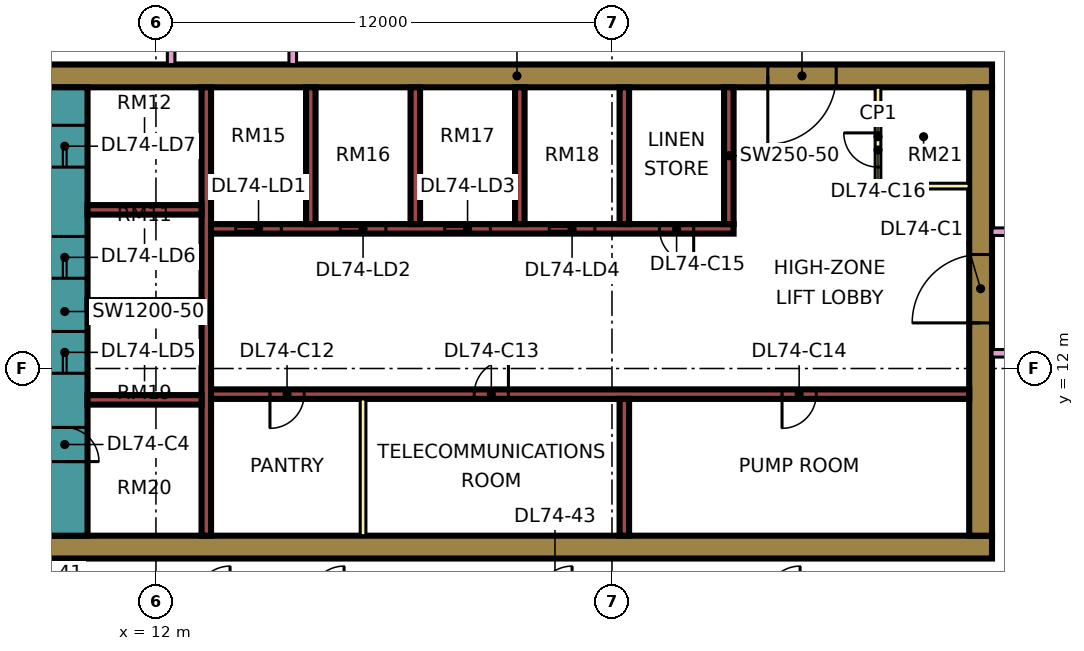
"""IFC4 building model, lengths in metres.
Left out: names, types, materials, properties, quantities, classifications, styles, units other than length and angle.
Written with IfcOpenShell. Run it as: python <this file> out.ifc"""

import sys

from ifc_helpers import new_model, si_unit, direction, frame, frame_2d, origin, place, context, subcontext, project, spatial, rectangle, extrude, element, fill, save


model = new_model("IFC4")
c1 = context("Model", 3, precision=1e-05, world=origin(), true_north=direction((0.0, 1.0)))
c2 = subcontext(c1, "Body", "Model", "MODEL_VIEW")
j1 = project(units=[si_unit("LENGTHUNIT", "METRE"), si_unit("PLANEANGLEUNIT", "RADIAN")], contexts=[c1])
p1 = place(None, origin())
s1 = spatial("IfcSite", under=j1, at=p1, CompositionType="ELEMENT")
p2 = place(p1, origin())
s2 = spatial("IfcBuilding", under=s1, at=p2, CompositionType="ELEMENT")
p3 = place(p2, frame((0.0, 0.0, 314.65)))
s3 = spatial("IfcBuildingStorey", under=s2, at=p3, CompositionType="ELEMENT", Elevation=314.65)
p4 = place(p3, frame((9.0, 7.3, 0.0), z_axis=(0.0, 0.0, 1.0), x_axis=(1.0, 0.0, 0.0)))
e1 = element("IfcWall", 1, at=p4, inside=s3, PredefinedType="SHEAR", context=c2, shape_type="SweptSolid", body=[
    extrude(rectangle(XDim=25.0, YDim=0.6, at=frame_2d((12.5, 0.0))), origin(), (0.0, 0.0, 1.0), 3.75),
])
p5 = place(p3, frame((9.0, 19.7, 0.0), z_axis=(0.0, 0.0, 1.0), x_axis=(1.0, 0.0, 0.0)))
e2 = element("IfcWall", 2, at=p5, inside=s3, PredefinedType="SHEAR", context=c2, shape_type="SweptSolid", body=[
    extrude(rectangle(XDim=25.0, YDim=0.6, at=frame_2d((12.5, 0.0))), origin(), (0.0, 0.0, 1.0), 3.75),
])
p6 = place(p5, frame((19.1, 0.0, 0.0)))
e3 = element("IfcOpeningElement", 3, at=p6, cuts=e2, PredefinedType="OPENING", context=c2, shape_type="SweptSolid", body=[
    extrude(rectangle(XDim=1.8, YDim=2.4, at=frame_2d((0.9, 1.2))), frame((0.0, 0.31, 0.0), z_axis=(0.0, -1.0, 0.0), x_axis=(1.0, 0.0, 0.0)), (0.0, 0.0, 1.0), 0.62),
])
p7 = place(p3, frame((9.6, 7.6, 0.0), z_axis=(0.0, 0.0, 1.0), x_axis=(0.0, 1.0, 0.0)))
e4 = element("IfcWall", 4, at=p7, inside=s3, PredefinedType="SHEAR", context=c2, shape_type="SweptSolid", body=[
    extrude(rectangle(XDim=11.8, YDim=1.2, at=frame_2d((5.9, 0.0))), origin(), (0.0, 0.0, 1.0), 3.75),
])
p8 = place(p7, frame((4.275, 0.0, 0.0)))
e5 = element("IfcOpeningElement", 5, at=p8, cuts=e4, PredefinedType="OPENING", context=c2, shape_type="SweptSolid", body=[
    extrude(rectangle(XDim=1.1, YDim=2.2, at=frame_2d((0.55, 1.1))), frame((0.0, 0.61, 0.0), z_axis=(0.0, -1.0, 0.0), x_axis=(1.0, 0.0, 0.0)), (0.0, 0.0, 1.0), 1.22),
])
p9 = place(p7, frame((6.775, 0.0, 0.0)))
e6 = element("IfcOpeningElement", 6, at=p9, cuts=e4, PredefinedType="OPENING", context=c2, shape_type="SweptSolid", body=[
    extrude(rectangle(XDim=1.1, YDim=2.2, at=frame_2d((0.55, 1.1))), frame((0.0, 0.61, 0.0), z_axis=(0.0, -1.0, 0.0), x_axis=(1.0, 0.0, 0.0)), (0.0, 0.0, 1.0), 1.22),
])
p10 = place(p7, frame((9.7, 0.0, 0.0)))
e7 = element("IfcOpeningElement", 7, at=p10, cuts=e4, PredefinedType="OPENING", context=c2, shape_type="SweptSolid", body=[
    extrude(rectangle(XDim=1.1, YDim=2.2, at=frame_2d((0.55, 1.1))), frame((0.0, 0.61, 0.0), z_axis=(0.0, -1.0, 0.0), x_axis=(1.0, 0.0, 0.0)), (0.0, 0.0, 1.0), 1.22),
])
p11 = place(p7, frame((1.95, 0.0, 0.0)))
e8 = element("IfcOpeningElement", 8, at=p11, cuts=e4, PredefinedType="OPENING", context=c2, shape_type="SweptSolid", body=[
    extrude(rectangle(XDim=0.9, YDim=2.1, at=frame_2d((0.45, 1.05))), frame((0.0, 0.61, 0.0), z_axis=(0.0, -1.0, 0.0), x_axis=(1.0, 0.0, 0.0)), (0.0, 0.0, 1.0), 1.22),
])
p12 = place(p3, frame((33.7, 7.6, 0.0), z_axis=(0.0, 0.0, 1.0), x_axis=(0.0, 1.0, 0.0)))
e9 = element("IfcWall", 9, at=p12, inside=s3, PredefinedType="SHEAR", context=c2, shape_type="SweptSolid", body=[
    extrude(rectangle(XDim=11.8, YDim=0.6, at=frame_2d((5.9, 0.0))), origin(), (0.0, 0.0, 1.0), 3.75),
])
p13 = place(p12, frame((5.6, 0.0, 0.0)))
e10 = element("IfcOpeningElement", 10, at=p13, cuts=e9, PredefinedType="OPENING", context=c2, shape_type="SweptSolid", body=[
    extrude(rectangle(XDim=1.8, YDim=2.4, at=frame_2d((0.9, 1.2))), frame((0.0, 0.31, 0.0), z_axis=(0.0, -1.0, 0.0), x_axis=(1.0, 0.0, 0.0)), (0.0, 0.0, 1.0), 0.62),
])
p14 = place(p3, frame((13.325, 7.6, 0.0), z_axis=(0.0, 0.0, 1.0), x_axis=(0.0, 1.0, 0.0)))
e11 = element("IfcWall", 11, at=p14, inside=s3, PredefinedType="SHEAR", context=c2, shape_type="SweptSolid", body=[
    extrude(rectangle(XDim=11.8, YDim=0.25, at=frame_2d((5.9, 0.0))), origin(), (0.0, 0.0, 1.0), 3.75),
])
p15 = place(p3, frame((13.45, 11.325, 0.0), z_axis=(0.0, 0.0, 1.0), x_axis=(1.0, 0.0, 0.0)))
e12 = element("IfcWall", 12, at=p15, inside=s3, PredefinedType="SHEAR", context=c2, shape_type="SweptSolid", body=[
    extrude(rectangle(XDim=19.95, YDim=0.25, at=frame_2d((9.975, 0.0))), origin(), (0.0, 0.0, 1.0), 3.75),
])
p16 = place(p15, frame((1.55, 0.0, 0.0)))
e13 = element("IfcOpeningElement", 13, at=p16, cuts=e12, PredefinedType="OPENING", context=c2, shape_type="SweptSolid", body=[
    extrude(rectangle(XDim=0.9, YDim=2.1, at=frame_2d((0.45, 1.05))), frame((0.0, 0.135, 0.0), z_axis=(0.0, -1.0, 0.0), x_axis=(1.0, 0.0, 0.0)), (0.0, 0.0, 1.0), 0.27),
])
p17 = place(p15, frame((6.925, 0.0, 0.0)))
e14 = element("IfcOpeningElement", 14, at=p17, cuts=e12, PredefinedType="OPENING", context=c2, shape_type="SweptSolid", body=[
    extrude(rectangle(XDim=0.9, YDim=2.1, at=frame_2d((0.45, 1.05))), frame((0.0, 0.135, 0.0), z_axis=(0.0, -1.0, 0.0), x_axis=(1.0, 0.0, 0.0)), (0.0, 0.0, 1.0), 0.27),
])
p18 = place(p15, frame((15.025, 0.0, 0.0)))
e15 = element("IfcOpeningElement", 15, at=p18, cuts=e12, PredefinedType="OPENING", context=c2, shape_type="SweptSolid", body=[
    extrude(rectangle(XDim=0.9, YDim=2.1, at=frame_2d((0.45, 1.05))), frame((0.0, 0.135, 0.0), z_axis=(0.0, -1.0, 0.0), x_axis=(1.0, 0.0, 0.0)), (0.0, 0.0, 1.0), 0.27),
])
p19 = place(p3, frame((13.45, 15.675, 0.0), z_axis=(0.0, 0.0, 1.0), x_axis=(1.0, 0.0, 0.0)))
e16 = element("IfcWall", 16, at=p19, inside=s3, PredefinedType="SHEAR", context=c2, shape_type="SweptSolid", body=[
    extrude(rectangle(XDim=13.75, YDim=0.25, at=frame_2d((6.875, 0.0))), origin(), (0.0, 0.0, 1.0), 3.75),
])
p20 = place(p19, frame((0.65, 0.0, 0.0)))
e17 = element("IfcOpeningElement", 17, at=p20, cuts=e16, PredefinedType="OPENING", context=c2, shape_type="SweptSolid", body=[
    extrude(rectangle(XDim=1.2, YDim=2.2, at=frame_2d((0.6, 1.1))), frame((0.0, 0.135, 0.0), z_axis=(0.0, -1.0, 0.0), x_axis=(1.0, 0.0, 0.0)), (0.0, 0.0, 1.0), 0.27),
])
p21 = place(p19, frame((3.4, 0.0, 0.0)))
e18 = element("IfcOpeningElement", 18, at=p21, cuts=e16, PredefinedType="OPENING", context=c2, shape_type="SweptSolid", body=[
    extrude(rectangle(XDim=1.2, YDim=2.2, at=frame_2d((0.6, 1.1))), frame((0.0, 0.135, 0.0), z_axis=(0.0, -1.0, 0.0), x_axis=(1.0, 0.0, 0.0)), (0.0, 0.0, 1.0), 0.27),
])
p22 = place(p19, frame((6.15, 0.0, 0.0)))
e19 = element("IfcOpeningElement", 19, at=p22, cuts=e16, PredefinedType="OPENING", context=c2, shape_type="SweptSolid", body=[
    extrude(rectangle(XDim=1.2, YDim=2.2, at=frame_2d((0.6, 1.1))), frame((0.0, 0.135, 0.0), z_axis=(0.0, -1.0, 0.0), x_axis=(1.0, 0.0, 0.0)), (0.0, 0.0, 1.0), 0.27),
])
p23 = place(p19, frame((8.9, 0.0, 0.0)))
e20 = element("IfcOpeningElement", 20, at=p23, cuts=e16, PredefinedType="OPENING", context=c2, shape_type="SweptSolid", body=[
    extrude(rectangle(XDim=1.2, YDim=2.2, at=frame_2d((0.6, 1.1))), frame((0.0, 0.135, 0.0), z_axis=(0.0, -1.0, 0.0), x_axis=(1.0, 0.0, 0.0)), (0.0, 0.0, 1.0), 0.27),
])
p24 = place(p19, frame((11.8, 0.0, 0.0)))
e21 = element("IfcOpeningElement", 21, at=p24, cuts=e16, PredefinedType="OPENING", context=c2, shape_type="SweptSolid", body=[
    extrude(rectangle(XDim=0.9, YDim=2.1, at=frame_2d((0.45, 1.05))), frame((0.0, 0.135, 0.0), z_axis=(0.0, -1.0, 0.0), x_axis=(1.0, 0.0, 0.0)), (0.0, 0.0, 1.0), 0.27),
])
for number, where, z_axis, x_axis in (
    (22, (10.2, 11.175, 0.0), (0.0, 0.0, 1.0), (1.0, 0.0, 0.0)),
    (23, (10.2, 13.675, 0.0), (0.0, 0.0, 1.0), (1.0, 0.0, 0.0)),
    (24, (10.2, 16.175, 0.0), (0.0, 0.0, 1.0), (1.0, 0.0, 0.0)),
):
    element("IfcWall", number, at=place(p3, frame(where, z_axis=z_axis, x_axis=x_axis)), inside=s3, PredefinedType="SHEAR", context=c2, shape_type="SweptSolid", body=[
        extrude(rectangle(XDim=3.0, YDim=0.25, at=frame_2d((1.5, 0.0))), origin(), (0.0, 0.0, 1.0), 3.75),
    ])
for number, where, z_axis, x_axis in (
    (25, (24.325, 7.6, 0.0), (0.0, 0.0, 1.0), (0.0, 1.0, 0.0)),
    (26, (16.075, 15.8, 0.0), (0.0, 0.0, 1.0), (0.0, 1.0, 0.0)),
    (27, (18.825, 15.8, 0.0), (0.0, 0.0, 1.0), (0.0, 1.0, 0.0)),
    (28, (21.575, 15.8, 0.0), (0.0, 0.0, 1.0), (0.0, 1.0, 0.0)),
    (29, (24.325, 15.8, 0.0), (0.0, 0.0, 1.0), (0.0, 1.0, 0.0)),
    (30, (27.075, 15.8, 0.0), (0.0, 0.0, 1.0), (0.0, 1.0, 0.0)),
):
    element("IfcWall", number, at=place(p3, frame(where, z_axis=z_axis, x_axis=x_axis)), inside=s3, PredefinedType="SHEAR", context=c2, shape_type="SweptSolid", body=[
        extrude(rectangle(XDim=3.6, YDim=0.25, at=frame_2d((1.8, 0.0))), origin(), (0.0, 0.0, 1.0), 3.75),
    ])
p25 = place(p3, frame((-1.447, 12.553, 0.0), z_axis=(0.0, 0.0, 1.0), x_axis=(0.707106781187, -0.707106781187, 0.0)))
e31 = element("IfcWall", 31, at=p25, inside=s3, PredefinedType="SOLIDWALL", context=c2, shape_type="SweptSolid", body=[
    extrude(rectangle(XDim=19.799, YDim=0.15, at=frame_2d((9.899, 0.0))), origin(), (0.0, 0.0, 1.0), 3.35),
])
p26 = place(p25, frame((2.212, 0.0, 0.45)))
e32 = element("IfcOpeningElement", 32, at=p26, cuts=e31, PredefinedType="OPENING", context=c2, shape_type="SweptSolid", body=[
    extrude(rectangle(XDim=3.0, YDim=2.4, at=frame_2d((1.5, 1.2))), frame((0.0, 0.085, 0.0), z_axis=(0.0, -1.0, 0.0), x_axis=(1.0, 0.0, 0.0)), (0.0, 0.0, 1.0), 0.17),
])
p27 = place(p25, frame((10.216, 0.0, 0.45)))
e33 = element("IfcOpeningElement", 33, at=p27, cuts=e31, PredefinedType="OPENING", context=c2, shape_type="SweptSolid", body=[
    extrude(rectangle(XDim=3.0, YDim=2.4, at=frame_2d((1.5, 1.2))), frame((0.0, 0.085, 0.0), z_axis=(0.0, -1.0, 0.0), x_axis=(1.0, 0.0, 0.0)), (0.0, 0.0, 1.0), 0.17),
])
p28 = place(p3, frame((17.45, 7.6, 0.0), z_axis=(0.0, 0.0, 1.0), x_axis=(0.0, 1.0, 0.0)))
e34 = element("IfcWall", 34, at=p28, inside=s3, PredefinedType="PARTITIONING", context=c2, shape_type="SweptSolid", body=[
    extrude(rectangle(XDim=3.6, YDim=0.15, at=frame_2d((1.8, 0.0))), origin(), (0.0, 0.0, 1.0), 3.35),
])
p29 = place(p3, frame((31.0, 16.8, 0.0), z_axis=(0.0, 0.0, 1.0), x_axis=(0.0, 1.0, 0.0)))
e35 = element("IfcWall", 35, at=p29, inside=s3, PredefinedType="PARTITIONING", context=c2, shape_type="SweptSolid", body=[
    extrude(rectangle(XDim=2.6, YDim=0.15, at=frame_2d((1.3, 0.0))), origin(), (0.0, 0.0, 1.0), 3.35),
])
p30 = place(p29, frame((0.5, 0.0, 0.0)))
e36 = element("IfcOpeningElement", 36, at=p30, cuts=e35, PredefinedType="OPENING", context=c2, shape_type="SweptSolid", body=[
    extrude(rectangle(XDim=0.9, YDim=2.1, at=frame_2d((0.45, 1.05))), frame((0.0, 0.085, 0.0), z_axis=(0.0, -1.0, 0.0), x_axis=(1.0, 0.0, 0.0)), (0.0, 0.0, 1.0), 0.17),
])
p31 = place(p3, frame((31.0, 16.8, 0.0), z_axis=(0.0, 0.0, 1.0), x_axis=(1.0, 0.0, 0.0)))
e37 = element("IfcWall", 37, at=p31, inside=s3, PredefinedType="PARTITIONING", context=c2, shape_type="SweptSolid", body=[
    extrude(rectangle(XDim=2.4, YDim=0.15, at=frame_2d((1.2, 0.0))), origin(), (0.0, 0.0, 1.0), 3.35),
])
p32 = place(p3, frame((12.4, 20.0, 0.0), z_axis=(0.0, 0.0, 1.0), x_axis=(0.0, 1.0, 0.0)))
e38 = element("IfcWall", 38, at=p32, inside=s3, PredefinedType="PARTITIONING", context=c2, shape_type="SweptSolid", body=[
    extrude(rectangle(XDim=33.926, YDim=0.2, at=frame_2d((16.963, 0.0))), origin(), (0.0, 0.0, 1.0), 3.35),
])
p33 = place(p32, frame((31.8, 0.0, 0.0)))
e39 = element("IfcOpeningElement", 39, at=p33, cuts=e38, PredefinedType="OPENING", context=c2, shape_type="SweptSolid", body=[
    extrude(rectangle(XDim=1.0, YDim=2.1, at=frame_2d((0.5, 1.05))), frame((0.0, 0.11, 0.0), z_axis=(0.0, -1.0, 0.0), x_axis=(1.0, 0.0, 0.0)), (0.0, 0.0, 1.0), 0.22),
])
p34 = place(p32, frame((0.6, 0.0, 0.0)))
e40 = element("IfcOpeningElement", 40, at=p34, cuts=e38, PredefinedType="OPENING", context=c2, shape_type="SweptSolid", body=[
    extrude(rectangle(XDim=1.2, YDim=2.1, at=frame_2d((0.6, 1.05))), frame((0.0, 0.11, 0.0), z_axis=(0.0, -1.0, 0.0), x_axis=(1.0, 0.0, 0.0)), (0.0, 0.0, 1.0), 0.22),
])
p35 = place(p32, frame((4.5, 0.0, 0.0)))
e41 = element("IfcOpeningElement", 41, at=p35, cuts=e38, PredefinedType="OPENING", context=c2, shape_type="SweptSolid", body=[
    extrude(rectangle(XDim=1.0, YDim=2.1, at=frame_2d((0.5, 1.05))), frame((0.0, 0.11, 0.0), z_axis=(0.0, -1.0, 0.0), x_axis=(1.0, 0.0, 0.0)), (0.0, 0.0, 1.0), 0.22),
])
p36 = place(p3, frame((15.6, 20.0, 0.0), z_axis=(0.0, 0.0, 1.0), x_axis=(0.0, 1.0, 0.0)))
e42 = element("IfcWall", 42, at=p36, inside=s3, PredefinedType="PARTITIONING", context=c2, shape_type="SweptSolid", body=[
    extrude(rectangle(XDim=27.775, YDim=0.2, at=frame_2d((13.887, 0.0))), origin(), (0.0, 0.0, 1.0), 3.35),
])
p37 = place(p36, frame((6.7, 0.0, 0.0)))
e43 = element("IfcOpeningElement", 43, at=p37, cuts=e42, PredefinedType="OPENING", context=c2, shape_type="SweptSolid", body=[
    extrude(rectangle(XDim=1.6, YDim=2.1, at=frame_2d((0.8, 1.05))), frame((0.0, 0.11, 0.0), z_axis=(0.0, -1.0, 0.0), x_axis=(1.0, 0.0, 0.0)), (0.0, 0.0, 1.0), 0.22),
])
p38 = place(p36, frame((12.95, 0.0, 0.0)))
e44 = element("IfcOpeningElement", 44, at=p38, cuts=e42, PredefinedType="OPENING", context=c2, shape_type="SweptSolid", body=[
    extrude(rectangle(XDim=1.0, YDim=2.1, at=frame_2d((0.5, 1.05))), frame((0.0, 0.11, 0.0), z_axis=(0.0, -1.0, 0.0), x_axis=(1.0, 0.0, 0.0)), (0.0, 0.0, 1.0), 0.22),
])
p39 = place(p36, frame((16.75, 0.0, 0.0)))
e45 = element("IfcOpeningElement", 45, at=p39, cuts=e42, PredefinedType="OPENING", context=c2, shape_type="SweptSolid", body=[
    extrude(rectangle(XDim=1.0, YDim=2.1, at=frame_2d((0.5, 1.05))), frame((0.0, 0.11, 0.0), z_axis=(0.0, -1.0, 0.0), x_axis=(1.0, 0.0, 0.0)), (0.0, 0.0, 1.0), 0.22),
])
p40 = place(p36, frame((1.15, 0.0, 0.0)))
e46 = element("IfcOpeningElement", 46, at=p40, cuts=e42, PredefinedType="OPENING", context=c2, shape_type="SweptSolid", body=[
    extrude(rectangle(XDim=1.8, YDim=2.1, at=frame_2d((0.9, 1.05))), frame((0.0, 0.11, 0.0), z_axis=(0.0, -1.0, 0.0), x_axis=(1.0, 0.0, 0.0)), (0.0, 0.0, 1.0), 0.22),
])
p41 = place(p36, frame((25.9, 0.0, 0.0)))
e47 = element("IfcOpeningElement", 47, at=p41, cuts=e42, PredefinedType="OPENING", context=c2, shape_type="SweptSolid", body=[
    extrude(rectangle(XDim=1.0, YDim=2.1, at=frame_2d((0.5, 1.05))), frame((0.0, 0.11, 0.0), z_axis=(0.0, -1.0, 0.0), x_axis=(1.0, 0.0, 0.0)), (0.0, 0.0, 1.0), 0.22),
])
p42 = place(p3, frame((34.0, 12.4, 0.0), z_axis=(0.0, 0.0, 1.0), x_axis=(1.0, 0.0, 0.0)))
e48 = element("IfcWall", 48, at=p42, inside=s3, PredefinedType="PARTITIONING", context=c2, shape_type="SweptSolid", body=[
    extrude(rectangle(XDim=2.401, YDim=0.2, at=frame_2d((1.2, 0.0))), origin(), (0.0, 0.0, 1.0), 3.35),
])
p43 = place(p3, frame((34.0, 15.6, 0.0), z_axis=(0.0, 0.0, 1.0), x_axis=(1.0, 0.0, 0.0)))
e49 = element("IfcWall", 49, at=p43, inside=s3, PredefinedType="PARTITIONING", context=c2, shape_type="SweptSolid", body=[
    extrude(rectangle(XDim=10.35, YDim=0.2, at=frame_2d((5.175, 0.0))), origin(), (0.0, 0.0, 1.0), 3.35),
])
p44 = place(p43, frame((5.6, 0.0, 0.0)))
e50 = element("IfcOpeningElement", 50, at=p44, cuts=e49, PredefinedType="OPENING", context=c2, shape_type="SweptSolid", body=[
    extrude(rectangle(XDim=1.0, YDim=2.1, at=frame_2d((0.5, 1.05))), frame((0.0, 0.11, 0.0), z_axis=(0.0, -1.0, 0.0), x_axis=(1.0, 0.0, 0.0)), (0.0, 0.0, 1.0), 0.22),
])
p45 = place(p43, frame((0.45, 0.0, 0.0)))
e51 = element("IfcOpeningElement", 51, at=p45, cuts=e49, PredefinedType="OPENING", context=c2, shape_type="SweptSolid", body=[
    extrude(rectangle(XDim=1.2, YDim=2.1, at=frame_2d((0.6, 1.05))), frame((0.0, 0.11, 0.0), z_axis=(0.0, -1.0, 0.0), x_axis=(1.0, 0.0, 0.0)), (0.0, 0.0, 1.0), 0.22),
])
p46 = place(p20, origin())
e52 = element("IfcDoor", 52, at=p46, inside=s3, OperationType="DOUBLE_DOOR_SLIDING", PredefinedType="DOOR", context=c2, shape_type="SweptSolid", body=[
    extrude(rectangle(XDim=1.2, YDim=2.2, at=frame_2d((0.6, 1.1))), frame((0.0, 0.025, 0.0), z_axis=(0.0, -1.0, 0.0), x_axis=(1.0, 0.0, 0.0)), (0.0, 0.0, 1.0), 0.05),
])
fill(e17, e52)
p47 = place(p21, origin())
e53 = element("IfcDoor", 53, at=p47, inside=s3, OperationType="DOUBLE_DOOR_SLIDING", PredefinedType="DOOR", context=c2, shape_type="SweptSolid", body=[
    extrude(rectangle(XDim=1.2, YDim=2.2, at=frame_2d((0.6, 1.1))), frame((0.0, 0.025, 0.0), z_axis=(0.0, -1.0, 0.0), x_axis=(1.0, 0.0, 0.0)), (0.0, 0.0, 1.0), 0.05),
])
fill(e18, e53)
p48 = place(p22, origin())
e54 = element("IfcDoor", 54, at=p48, inside=s3, OperationType="DOUBLE_DOOR_SLIDING", PredefinedType="DOOR", context=c2, shape_type="SweptSolid", body=[
    extrude(rectangle(XDim=1.2, YDim=2.2, at=frame_2d((0.6, 1.1))), frame((0.0, 0.025, 0.0), z_axis=(0.0, -1.0, 0.0), x_axis=(1.0, 0.0, 0.0)), (0.0, 0.0, 1.0), 0.05),
])
fill(e19, e54)
p49 = place(p23, origin())
e55 = element("IfcDoor", 55, at=p49, inside=s3, OperationType="DOUBLE_DOOR_SLIDING", PredefinedType="DOOR", context=c2, shape_type="SweptSolid", body=[
    extrude(rectangle(XDim=1.2, YDim=2.2, at=frame_2d((0.6, 1.1))), frame((0.0, 0.025, 0.0), z_axis=(0.0, -1.0, 0.0), x_axis=(1.0, 0.0, 0.0)), (0.0, 0.0, 1.0), 0.05),
])
fill(e20, e55)
p50 = place(p8, origin())
e56 = element("IfcDoor", 56, at=p50, inside=s3, OperationType="DOUBLE_DOOR_SLIDING", PredefinedType="DOOR", context=c2, shape_type="SweptSolid", body=[
    extrude(rectangle(XDim=1.1, YDim=2.2, at=frame_2d((0.55, 1.1))), frame((0.0, 0.025, 0.0), z_axis=(0.0, -1.0, 0.0), x_axis=(1.0, 0.0, 0.0)), (0.0, 0.0, 1.0), 0.05),
])
fill(e5, e56)
p51 = place(p9, origin())
e57 = element("IfcDoor", 57, at=p51, inside=s3, OperationType="DOUBLE_DOOR_SLIDING", PredefinedType="DOOR", context=c2, shape_type="SweptSolid", body=[
    extrude(rectangle(XDim=1.1, YDim=2.2, at=frame_2d((0.55, 1.1))), frame((0.0, 0.025, 0.0), z_axis=(0.0, -1.0, 0.0), x_axis=(1.0, 0.0, 0.0)), (0.0, 0.0, 1.0), 0.05),
])
fill(e6, e57)
p52 = place(p10, origin())
e58 = element("IfcDoor", 58, at=p52, inside=s3, OperationType="DOUBLE_DOOR_SLIDING", PredefinedType="DOOR", context=c2, shape_type="SweptSolid", body=[
    extrude(rectangle(XDim=1.1, YDim=2.2, at=frame_2d((0.55, 1.1))), frame((0.0, 0.025, 0.0), z_axis=(0.0, -1.0, 0.0), x_axis=(1.0, 0.0, 0.0)), (0.0, 0.0, 1.0), 0.05),
])
fill(e7, e58)
p53 = place(p13, origin())
e59 = element("IfcDoor", 59, at=p53, inside=s3, OperationType="DOUBLE_DOOR_SINGLE_SWING", PredefinedType="DOOR", context=c2, shape_type="SweptSolid", body=[
    extrude(rectangle(XDim=1.8, YDim=2.4, at=frame_2d((0.9, 1.2))), frame((0.0, 0.025, 0.0), z_axis=(0.0, -1.0, 0.0), x_axis=(1.0, 0.0, 0.0)), (0.0, 0.0, 1.0), 0.05),
])
fill(e10, e59)
p54 = place(p6, frame((1.8, 0.0, 0.0), z_axis=(0.0, 0.0, 1.0), x_axis=(-1.0, 0.0, 0.0)))
e60 = element("IfcDoor", 60, at=p54, inside=s3, OperationType="DOUBLE_DOOR_SINGLE_SWING", PredefinedType="DOOR", context=c2, shape_type="SweptSolid", body=[
    extrude(rectangle(XDim=1.8, YDim=2.4, at=frame_2d((0.9, 1.2))), frame((0.0, 0.025, 0.0), z_axis=(0.0, -1.0, 0.0), x_axis=(1.0, 0.0, 0.0)), (0.0, 0.0, 1.0), 0.05),
])
fill(e3, e60)
p55 = place(p11, frame((0.9, 0.0, 0.0), z_axis=(0.0, 0.0, 1.0), x_axis=(-1.0, 0.0, 0.0)))
e61 = element("IfcDoor", 61, at=p55, inside=s3, OperationType="SINGLE_SWING_LEFT", PredefinedType="DOOR", context=c2, shape_type="SweptSolid", body=[
    extrude(rectangle(XDim=0.9, YDim=2.1, at=frame_2d((0.45, 1.05))), frame((0.0, 0.025, 0.0), z_axis=(0.0, -1.0, 0.0), x_axis=(1.0, 0.0, 0.0)), (0.0, 0.0, 1.0), 0.05),
])
fill(e8, e61)
p56 = place(p16, frame((0.9, 0.0, 0.0), z_axis=(0.0, 0.0, 1.0), x_axis=(-1.0, 0.0, 0.0)))
e62 = element("IfcDoor", 62, at=p56, inside=s3, OperationType="SINGLE_SWING_LEFT", PredefinedType="DOOR", context=c2, shape_type="SweptSolid", body=[
    extrude(rectangle(XDim=0.9, YDim=2.1, at=frame_2d((0.45, 1.05))), frame((0.0, 0.025, 0.0), z_axis=(0.0, -1.0, 0.0), x_axis=(1.0, 0.0, 0.0)), (0.0, 0.0, 1.0), 0.05),
])
fill(e13, e62)
p57 = place(p17, frame((0.9, 0.0, 0.0), z_axis=(0.0, 0.0, 1.0), x_axis=(-1.0, 0.0, 0.0)))
e63 = element("IfcDoor", 63, at=p57, inside=s3, OperationType="SINGLE_SWING_RIGHT", PredefinedType="DOOR", context=c2, shape_type="SweptSolid", body=[
    extrude(rectangle(XDim=0.9, YDim=2.1, at=frame_2d((0.45, 1.05))), frame((0.0, 0.025, 0.0), z_axis=(0.0, -1.0, 0.0), x_axis=(1.0, 0.0, 0.0)), (0.0, 0.0, 1.0), 0.05),
])
fill(e14, e63)
p58 = place(p18, frame((0.9, 0.0, 0.0), z_axis=(0.0, 0.0, 1.0), x_axis=(-1.0, 0.0, 0.0)))
e64 = element("IfcDoor", 64, at=p58, inside=s3, OperationType="SINGLE_SWING_LEFT", PredefinedType="DOOR", context=c2, shape_type="SweptSolid", body=[
    extrude(rectangle(XDim=0.9, YDim=2.1, at=frame_2d((0.45, 1.05))), frame((0.0, 0.025, 0.0), z_axis=(0.0, -1.0, 0.0), x_axis=(1.0, 0.0, 0.0)), (0.0, 0.0, 1.0), 0.05),
])
fill(e15, e64)
p59 = place(p24, origin())
e65 = element("IfcDoor", 65, at=p59, inside=s3, OperationType="SINGLE_SWING_RIGHT", PredefinedType="DOOR", context=c2, shape_type="SweptSolid", body=[
    extrude(rectangle(XDim=0.9, YDim=2.1, at=frame_2d((0.45, 1.05))), frame((0.0, 0.025, 0.0), z_axis=(0.0, -1.0, 0.0), x_axis=(1.0, 0.0, 0.0)), (0.0, 0.0, 1.0), 0.05),
])
fill(e21, e65)
p60 = place(p30, frame((0.9, 0.0, 0.0), z_axis=(0.0, 0.0, 1.0), x_axis=(-1.0, 0.0, 0.0)))
e66 = element("IfcDoor", 66, at=p60, inside=s3, OperationType="SINGLE_SWING_RIGHT", PredefinedType="DOOR", context=c2, shape_type="SweptSolid", body=[
    extrude(rectangle(XDim=0.9, YDim=2.1, at=frame_2d((0.45, 1.05))), frame((0.0, 0.025, 0.0), z_axis=(0.0, -1.0, 0.0), x_axis=(1.0, 0.0, 0.0)), (0.0, 0.0, 1.0), 0.05),
])
fill(e36, e66)
save(model, sys.argv[1])
